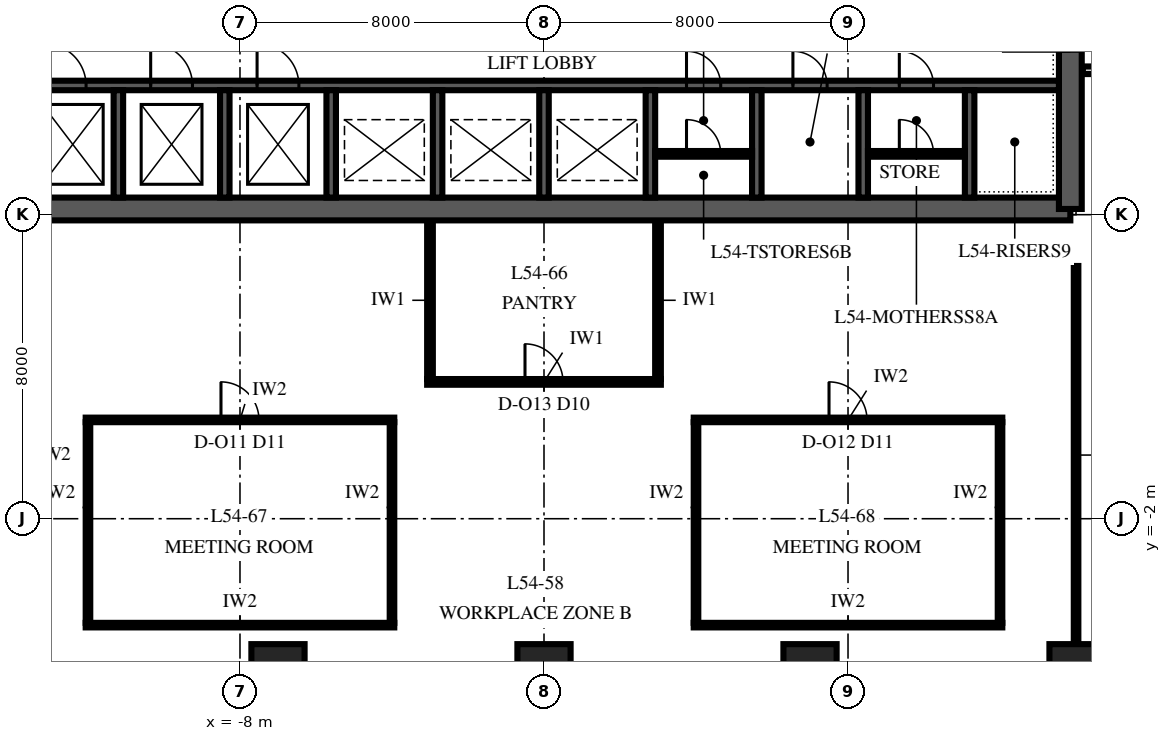
"""IFC4 building model, lengths in metres.
Left out: names, types, materials, properties, quantities, classifications, styles, units other than length and angle.
Written with IfcOpenShell. Run it as: python <this file> out.ifc"""

import sys

from ifc_helpers import new_model, si_unit, direction, frame, frame_2d, origin, origin_2d, place, context, subcontext, project, spatial, polyline, rectangle, outline, extrude, element, fill, save


model = new_model("IFC4")
c1 = context("Model", 3, precision=1e-05, world=origin(), true_north=direction((0.0, 1.0)))
c2 = subcontext(c1, "Body", "Model", "MODEL_VIEW")
j1 = project(units=[si_unit("LENGTHUNIT", "METRE"), si_unit("PLANEANGLEUNIT", "RADIAN")], contexts=[c1])
p1 = place(None, origin())
s1 = spatial("IfcSite", under=j1, at=p1, CompositionType="ELEMENT")
p2 = place(p1, origin())
s2 = spatial("IfcBuilding", under=s1, at=p2, CompositionType="ELEMENT")
p3 = place(p2, frame((0.0, 0.0, 234.0)))
s3 = spatial("IfcBuildingStorey", under=s2, at=p3, CompositionType="ELEMENT", Elevation=234.0)
for number, where, z_axis, x_axis in (
    (1, (-7.0, -6.0, 0.0), (0.0, 0.0, 1.0), (1.0, 0.0, 0.0)),
    (2, (0.0, -6.0, 0.0), (0.0, 0.0, 1.0), (1.0, 0.0, 0.0)),
    (3, (7.0, -6.0, 0.0), (0.0, 0.0, 1.0), (1.0, 0.0, 0.0)),
    (4, (14.0, -6.0, 0.0), (0.0, 0.0, 1.0), (1.0, 0.0, 0.0)),
):
    element("IfcColumn", number, at=place(p3, frame(where, z_axis=z_axis, x_axis=x_axis)), inside=s3, PredefinedType="COLUMN", context=c2, shape_type="SweptSolid", body=[
        extrude(rectangle(XDim=1.4, YDim=1.4, at=origin_2d()), origin(), (0.0, 0.0, 1.0), 4.0),
    ])
p4 = place(p3, frame((-13.85, 6.15, 0.0), z_axis=(0.0, 0.0, 1.0), x_axis=(1.0, 0.0, 0.0)))
e5 = element("IfcWall", 5, at=p4, inside=s3, PredefinedType="SHEAR", context=c2, shape_type="SweptSolid", body=[
    extrude(rectangle(XDim=27.7, YDim=0.6, at=frame_2d((13.85, 0.0))), origin(), (0.0, 0.0, 1.0), 4.0),
])
p5 = place(p3, frame((13.85, 6.15, 0.0), z_axis=(0.0, 0.0, 1.0), x_axis=(0.0, 1.0, 0.0)))
e6 = element("IfcWall", 6, at=p5, inside=s3, PredefinedType="SHEAR", context=c2, shape_type="SweptSolid", body=[
    extrude(outline(polyline([(0.0, -0.3), (17.7, -0.3), (17.7, 0.0), (17.4, 0.0), (17.4, 0.3), (0.3, 0.3), (0.3, 0.0), (0.0, 0.0), (0.0, -0.3)])), origin(), (0.0, 0.0, 1.0), 4.0),
])
p6 = place(p5, frame((4.15, 0.0, 0.0)))
e7 = element("IfcOpeningElement", 7, at=p6, cuts=e6, PredefinedType="OPENING", context=c2, shape_type="SweptSolid", body=[
    extrude(rectangle(XDim=1.8, YDim=2.4, at=frame_2d((0.9, 1.2))), frame((0.0, 0.315, 0.0), z_axis=(0.0, -1.0, 0.0), x_axis=(1.0, 0.0, 0.0)), (0.0, 0.0, 1.0), 0.63),
])
p7 = place(p3, frame((-13.55, 9.4, 0.0), z_axis=(0.0, 0.0, 1.0), x_axis=(1.0, 0.0, 0.0)))
e8 = element("IfcWall", 8, at=p7, inside=s3, PredefinedType="SHEAR", context=c2, shape_type="SweptSolid", body=[
    extrude(rectangle(XDim=27.1, YDim=0.25, at=frame_2d((13.55, 0.0))), origin(), (0.0, 0.0, 1.0), 4.0),
])
p8 = place(p7, frame((0.4, 0.0, 0.0)))
e9 = element("IfcOpeningElement", 9, at=p8, cuts=e8, PredefinedType="OPENING", context=c2, shape_type="SweptSolid", body=[
    extrude(rectangle(XDim=1.1, YDim=2.1, at=frame_2d((0.55, 1.05))), frame((0.0, 0.14, 0.0), z_axis=(0.0, -1.0, 0.0), x_axis=(1.0, 0.0, 0.0)), (0.0, 0.0, 1.0), 0.28),
])
p9 = place(p7, frame((3.2, 0.0, 0.0)))
e10 = element("IfcOpeningElement", 10, at=p9, cuts=e8, PredefinedType="OPENING", context=c2, shape_type="SweptSolid", body=[
    extrude(rectangle(XDim=1.1, YDim=2.1, at=frame_2d((0.55, 1.05))), frame((0.0, 0.14, 0.0), z_axis=(0.0, -1.0, 0.0), x_axis=(1.0, 0.0, 0.0)), (0.0, 0.0, 1.0), 0.28),
])
p10 = place(p7, frame((6.0, 0.0, 0.0)))
e11 = element("IfcOpeningElement", 11, at=p10, cuts=e8, PredefinedType="OPENING", context=c2, shape_type="SweptSolid", body=[
    extrude(rectangle(XDim=1.1, YDim=2.1, at=frame_2d((0.55, 1.05))), frame((0.0, 0.14, 0.0), z_axis=(0.0, -1.0, 0.0), x_axis=(1.0, 0.0, 0.0)), (0.0, 0.0, 1.0), 0.28),
])
p11 = place(p7, frame((17.3, 0.0, 0.0)))
e12 = element("IfcOpeningElement", 12, at=p11, cuts=e8, PredefinedType="OPENING", context=c2, shape_type="SweptSolid", body=[
    extrude(rectangle(XDim=0.9, YDim=2.1, at=frame_2d((0.45, 1.05))), frame((0.0, 0.14, 0.0), z_axis=(0.0, -1.0, 0.0), x_axis=(1.0, 0.0, 0.0)), (0.0, 0.0, 1.0), 0.28),
])
p12 = place(p7, frame((20.1, 0.0, 0.0)))
e13 = element("IfcOpeningElement", 13, at=p12, cuts=e8, PredefinedType="OPENING", context=c2, shape_type="SweptSolid", body=[
    extrude(rectangle(XDim=0.9, YDim=2.1, at=frame_2d((0.45, 1.05))), frame((0.0, 0.14, 0.0), z_axis=(0.0, -1.0, 0.0), x_axis=(1.0, 0.0, 0.0)), (0.0, 0.0, 1.0), 0.28),
])
p13 = place(p7, frame((22.9, 0.0, 0.0)))
e14 = element("IfcOpeningElement", 14, at=p13, cuts=e8, PredefinedType="OPENING", context=c2, shape_type="SweptSolid", body=[
    extrude(rectangle(XDim=0.9, YDim=2.1, at=frame_2d((0.45, 1.05))), frame((0.0, 0.14, 0.0), z_axis=(0.0, -1.0, 0.0), x_axis=(1.0, 0.0, 0.0)), (0.0, 0.0, 1.0), 0.28),
])
for number, where, z_axis, x_axis in (
    (15, (-11.2, 6.45, 0.0), (0.0, 0.0, 1.0), (0.0, 1.0, 0.0)),
    (16, (-8.4, 6.45, 0.0), (0.0, 0.0, 1.0), (0.0, 1.0, 0.0)),
    (17, (-5.6, 6.45, 0.0), (0.0, 0.0, 1.0), (0.0, 1.0, 0.0)),
    (18, (-2.8, 6.45, 0.0), (0.0, 0.0, 1.0), (0.0, 1.0, 0.0)),
    (19, (0.0, 6.45, 0.0), (0.0, 0.0, 1.0), (0.0, 1.0, 0.0)),
    (20, (2.8, 6.45, 0.0), (0.0, 0.0, 1.0), (0.0, 1.0, 0.0)),
    (21, (5.6, 6.45, 0.0), (0.0, 0.0, 1.0), (0.0, 1.0, 0.0)),
    (22, (8.4, 6.45, 0.0), (0.0, 0.0, 1.0), (0.0, 1.0, 0.0)),
    (23, (11.2, 6.45, 0.0), (0.0, 0.0, 1.0), (0.0, 1.0, 0.0)),
):
    element("IfcWall", number, at=place(p3, frame(where, z_axis=z_axis, x_axis=x_axis)), inside=s3, PredefinedType="SHEAR", context=c2, shape_type="SweptSolid", body=[
        extrude(rectangle(XDim=2.825, YDim=0.25, at=frame_2d((1.413, 0.0))), origin(), (0.0, 0.0, 1.0), 4.0),
    ])
p14 = place(p3, frame((2.925, 7.6, 0.0), z_axis=(0.0, 0.0, 1.0), x_axis=(1.0, 0.0, 0.0)))
e24 = element("IfcWall", 24, at=p14, inside=s3, PredefinedType="PARTITIONING", context=c2, shape_type="SweptSolid", body=[
    extrude(rectangle(XDim=2.55, YDim=0.15, at=frame_2d((1.275, 0.0))), origin(), (0.0, 0.0, 1.0), 3.85),
])
p15 = place(p14, frame((0.825, 0.0, 0.0)))
e25 = element("IfcOpeningElement", 25, at=p15, cuts=e24, PredefinedType="OPENING", context=c2, shape_type="SweptSolid", body=[
    extrude(rectangle(XDim=0.9, YDim=2.1, at=frame_2d((0.45, 1.05))), frame((0.0, 0.09, 0.0), z_axis=(0.0, -1.0, 0.0), x_axis=(1.0, 0.0, 0.0)), (0.0, 0.0, 1.0), 0.18),
])
p16 = place(p3, frame((8.525, 7.6, 0.0), z_axis=(0.0, 0.0, 1.0), x_axis=(1.0, 0.0, 0.0)))
e26 = element("IfcWall", 26, at=p16, inside=s3, PredefinedType="PARTITIONING", context=c2, shape_type="SweptSolid", body=[
    extrude(rectangle(XDim=2.55, YDim=0.15, at=frame_2d((1.275, 0.0))), origin(), (0.0, 0.0, 1.0), 3.85),
])
p17 = place(p16, frame((0.825, 0.0, 0.0)))
e27 = element("IfcOpeningElement", 27, at=p17, cuts=e26, PredefinedType="OPENING", context=c2, shape_type="SweptSolid", body=[
    extrude(rectangle(XDim=0.9, YDim=2.1, at=frame_2d((0.45, 1.05))), frame((0.0, 0.09, 0.0), z_axis=(0.0, -1.0, 0.0), x_axis=(1.0, 0.0, 0.0)), (0.0, 0.0, 1.0), 0.18),
])
for number, where, z_axis, x_axis in (
    (28, (-12.06, -4.8, 0.0), (0.0, 0.0, 1.0), (1.0, 0.0, 0.0)),
    (29, (3.94, -4.8, 0.0), (0.0, 0.0, 1.0), (1.0, 0.0, 0.0)),
):
    element("IfcWall", number, at=place(p3, frame(where, z_axis=z_axis, x_axis=x_axis)), inside=s3, PredefinedType="PARTITIONING", context=c2, shape_type="SweptSolid", body=[
        extrude(rectangle(XDim=8.12, YDim=0.12, at=frame_2d((4.06, 0.0))), origin(), (0.0, 0.0, 1.0), 3.25),
    ])
p18 = place(p3, frame((-12.06, 0.6, 0.0), z_axis=(0.0, 0.0, 1.0), x_axis=(1.0, 0.0, 0.0)))
e30 = element("IfcWall", 30, at=p18, inside=s3, PredefinedType="PARTITIONING", context=c2, shape_type="SweptSolid", body=[
    extrude(rectangle(XDim=8.12, YDim=0.12, at=frame_2d((4.06, 0.0))), origin(), (0.0, 0.0, 1.0), 3.25),
])
p19 = place(p18, frame((3.56, 0.0, 0.0)))
e31 = element("IfcOpeningElement", 31, at=p19, cuts=e30, PredefinedType="OPENING", context=c2, shape_type="SweptSolid", body=[
    extrude(rectangle(XDim=1.0, YDim=2.4, at=frame_2d((0.5, 1.2))), frame((0.0, 0.075, 0.0), z_axis=(0.0, -1.0, 0.0), x_axis=(1.0, 0.0, 0.0)), (0.0, 0.0, 1.0), 0.15),
])
p20 = place(p3, frame((3.94, 0.6, 0.0), z_axis=(0.0, 0.0, 1.0), x_axis=(1.0, 0.0, 0.0)))
e32 = element("IfcWall", 32, at=p20, inside=s3, PredefinedType="PARTITIONING", context=c2, shape_type="SweptSolid", body=[
    extrude(rectangle(XDim=8.12, YDim=0.12, at=frame_2d((4.06, 0.0))), origin(), (0.0, 0.0, 1.0), 3.25),
])
p21 = place(p20, frame((3.56, 0.0, 0.0)))
e33 = element("IfcOpeningElement", 33, at=p21, cuts=e32, PredefinedType="OPENING", context=c2, shape_type="SweptSolid", body=[
    extrude(rectangle(XDim=1.0, YDim=2.4, at=frame_2d((0.5, 1.2))), frame((0.0, 0.075, 0.0), z_axis=(0.0, -1.0, 0.0), x_axis=(1.0, 0.0, 0.0)), (0.0, 0.0, 1.0), 0.15),
])
p22 = place(p3, frame((-3.075, 1.6, 0.0), z_axis=(0.0, 0.0, 1.0), x_axis=(1.0, 0.0, 0.0)))
e34 = element("IfcWall", 34, at=p22, inside=s3, PredefinedType="PARTITIONING", context=c2, shape_type="SweptSolid", body=[
    extrude(rectangle(XDim=6.15, YDim=0.15, at=frame_2d((3.075, 0.0))), origin(), (0.0, 0.0, 1.0), 3.25),
])
p23 = place(p22, frame((2.575, 0.0, 0.0)))
e35 = element("IfcOpeningElement", 35, at=p23, cuts=e34, PredefinedType="OPENING", context=c2, shape_type="SweptSolid", body=[
    extrude(rectangle(XDim=1.0, YDim=2.3, at=frame_2d((0.5, 1.15))), frame((0.0, 0.09, 0.0), z_axis=(0.0, -1.0, 0.0), x_axis=(1.0, 0.0, 0.0)), (0.0, 0.0, 1.0), 0.18),
])
p24 = place(p3, frame((14.18, 9.8, 0.0), z_axis=(0.0, 0.0, 1.0), x_axis=(1.0, 0.0, 0.0)))
e36 = element("IfcWall", 36, at=p24, inside=s3, PredefinedType="PARTITIONING", context=c2, shape_type="SweptSolid", body=[
    extrude(rectangle(XDim=2.02, YDim=0.2, at=frame_2d((1.01, 0.0))), origin(), (0.0, 0.0, 1.0), 3.85),
])
for number, where, z_axis, x_axis in (
    (37, (-12.0, -4.74, 0.0), (0.0, 0.0, 1.0), (0.0, 1.0, 0.0)),
    (38, (-4.0, -4.74, 0.0), (0.0, 0.0, 1.0), (0.0, 1.0, 0.0)),
):
    element("IfcWall", number, at=place(p3, frame(where, z_axis=z_axis, x_axis=x_axis)), inside=s3, PredefinedType="PARTITIONING", context=c2, shape_type="SweptSolid", body=[
        extrude(rectangle(XDim=5.28, YDim=0.12, at=frame_2d((2.64, 0.0))), origin(), (0.0, 0.0, 1.0), 3.85),
    ])
for number, where, z_axis, x_axis in (
    (39, (-3.0, 1.675, 0.0), (0.0, 0.0, 1.0), (0.0, 1.0, 0.0)),
    (40, (3.0, 1.675, 0.0), (0.0, 0.0, 1.0), (0.0, 1.0, 0.0)),
):
    element("IfcWall", number, at=place(p3, frame(where, z_axis=z_axis, x_axis=x_axis)), inside=s3, PredefinedType="PARTITIONING", context=c2, shape_type="SweptSolid", body=[
        extrude(rectangle(XDim=4.145, YDim=0.15, at=frame_2d((2.073, 0.0))), origin(), (0.0, 0.0, 1.0), 3.85),
    ])
for number, where, z_axis, x_axis in (
    (41, (4.0, -4.74, 0.0), (0.0, 0.0, 1.0), (0.0, 1.0, 0.0)),
    (42, (12.0, -4.74, 0.0), (0.0, 0.0, 1.0), (0.0, 1.0, 0.0)),
):
    element("IfcWall", number, at=place(p3, frame(where, z_axis=z_axis, x_axis=x_axis)), inside=s3, PredefinedType="PARTITIONING", context=c2, shape_type="SweptSolid", body=[
        extrude(rectangle(XDim=5.28, YDim=0.12, at=frame_2d((2.64, 0.0))), origin(), (0.0, 0.0, 1.0), 3.85),
    ])
p25 = place(p3, frame((14.001, -5.3, 0.0), z_axis=(0.0, 0.0, 1.0), x_axis=(0.0, 1.0, 0.0)))
e43 = element("IfcWall", 43, at=p25, inside=s3, PredefinedType="PARTITIONING", context=c2, shape_type="SweptSolid", body=[
    extrude(rectangle(XDim=9.95, YDim=0.12, at=frame_2d((4.975, 0.0))), origin(), (0.0, 0.0, 1.0), 3.25),
])
p26 = place(p8, origin())
e44 = element("IfcDoor", 44, at=p26, inside=s3, OperationType="SLIDING_TO_LEFT", PredefinedType="DOOR", context=c2, shape_type="SweptSolid", body=[
    extrude(rectangle(XDim=1.1, YDim=2.1, at=frame_2d((0.55, 1.05))), frame((0.0, 0.125, 0.0), z_axis=(0.0, -1.0, 0.0), x_axis=(1.0, 0.0, 0.0)), (0.0, 0.0, 1.0), 0.25),
])
fill(e9, e44)
p27 = place(p9, origin())
e45 = element("IfcDoor", 45, at=p27, inside=s3, OperationType="SLIDING_TO_LEFT", PredefinedType="DOOR", context=c2, shape_type="SweptSolid", body=[
    extrude(rectangle(XDim=1.1, YDim=2.1, at=frame_2d((0.55, 1.05))), frame((0.0, 0.125, 0.0), z_axis=(0.0, -1.0, 0.0), x_axis=(1.0, 0.0, 0.0)), (0.0, 0.0, 1.0), 0.25),
])
fill(e10, e45)
p28 = place(p10, origin())
e46 = element("IfcDoor", 46, at=p28, inside=s3, OperationType="SLIDING_TO_LEFT", PredefinedType="DOOR", context=c2, shape_type="SweptSolid", body=[
    extrude(rectangle(XDim=1.1, YDim=2.1, at=frame_2d((0.55, 1.05))), frame((0.0, 0.125, 0.0), z_axis=(0.0, -1.0, 0.0), x_axis=(1.0, 0.0, 0.0)), (0.0, 0.0, 1.0), 0.25),
])
fill(e11, e46)
p29 = place(p11, origin())
e47 = element("IfcDoor", 47, at=p29, inside=s3, OperationType="SINGLE_SWING_LEFT", PredefinedType="DOOR", context=c2, shape_type="SweptSolid", body=[
    extrude(rectangle(XDim=0.9, YDim=2.1, at=frame_2d((0.45, 1.05))), frame((0.0, 0.125, 0.0), z_axis=(0.0, -1.0, 0.0), x_axis=(1.0, 0.0, 0.0)), (0.0, 0.0, 1.0), 0.25),
])
fill(e12, e47)
p30 = place(p15, origin())
e48 = element("IfcDoor", 48, at=p30, inside=s3, OperationType="SINGLE_SWING_LEFT", PredefinedType="DOOR", context=c2, shape_type="SweptSolid", body=[
    extrude(rectangle(XDim=0.9, YDim=2.1, at=frame_2d((0.45, 1.05))), frame((0.0, 0.075, 0.0), z_axis=(0.0, -1.0, 0.0), x_axis=(1.0, 0.0, 0.0)), (0.0, 0.0, 1.0), 0.149),
])
fill(e25, e48)
p31 = place(p12, origin())
e49 = element("IfcDoor", 49, at=p31, inside=s3, OperationType="SINGLE_SWING_LEFT", PredefinedType="DOOR", context=c2, shape_type="SweptSolid", body=[
    extrude(rectangle(XDim=0.9, YDim=2.1, at=frame_2d((0.45, 1.05))), frame((0.0, 0.125, 0.0), z_axis=(0.0, -1.0, 0.0), x_axis=(1.0, 0.0, 0.0)), (0.0, 0.0, 1.0), 0.25),
])
fill(e13, e49)
p32 = place(p13, origin())
e50 = element("IfcDoor", 50, at=p32, inside=s3, OperationType="SINGLE_SWING_LEFT", PredefinedType="DOOR", context=c2, shape_type="SweptSolid", body=[
    extrude(rectangle(XDim=0.9, YDim=2.1, at=frame_2d((0.45, 1.05))), frame((0.0, 0.125, 0.0), z_axis=(0.0, -1.0, 0.0), x_axis=(1.0, 0.0, 0.0)), (0.0, 0.0, 1.0), 0.25),
])
fill(e14, e50)
p33 = place(p17, origin())
e51 = element("IfcDoor", 51, at=p33, inside=s3, OperationType="SINGLE_SWING_LEFT", PredefinedType="DOOR", context=c2, shape_type="SweptSolid", body=[
    extrude(rectangle(XDim=0.9, YDim=2.1, at=frame_2d((0.45, 1.05))), frame((0.0, 0.075, 0.0), z_axis=(0.0, -1.0, 0.0), x_axis=(1.0, 0.0, 0.0)), (0.0, 0.0, 1.0), 0.149),
])
fill(e27, e51)
p34 = place(p19, origin())
e52 = element("IfcDoor", 52, at=p34, inside=s3, OperationType="SINGLE_SWING_RIGHT", PredefinedType="DOOR", context=c2, shape_type="SweptSolid", body=[
    extrude(rectangle(XDim=1.0, YDim=2.4, at=frame_2d((0.5, 1.2))), frame((0.0, 0.06, 0.0), z_axis=(0.0, -1.0, 0.0), x_axis=(1.0, 0.0, 0.0)), (0.0, 0.0, 1.0), 0.12),
])
fill(e31, e52)
p35 = place(p21, origin())
e53 = element("IfcDoor", 53, at=p35, inside=s3, OperationType="SINGLE_SWING_RIGHT", PredefinedType="DOOR", context=c2, shape_type="SweptSolid", body=[
    extrude(rectangle(XDim=1.0, YDim=2.4, at=frame_2d((0.5, 1.2))), frame((0.0, 0.06, 0.0), z_axis=(0.0, -1.0, 0.0), x_axis=(1.0, 0.0, 0.0)), (0.0, 0.0, 1.0), 0.12),
])
fill(e33, e53)
p36 = place(p23, origin())
e54 = element("IfcDoor", 54, at=p36, inside=s3, OperationType="SINGLE_SWING_LEFT", PredefinedType="DOOR", context=c2, shape_type="SweptSolid", body=[
    extrude(rectangle(XDim=1.0, YDim=2.3, at=frame_2d((0.5, 1.15))), frame((0.0, 0.075, 0.0), z_axis=(0.0, -1.0, 0.0), x_axis=(1.0, 0.0, 0.0)), (0.0, 0.0, 1.0), 0.149),
])
fill(e35, e54)
save(model, sys.argv[1])
